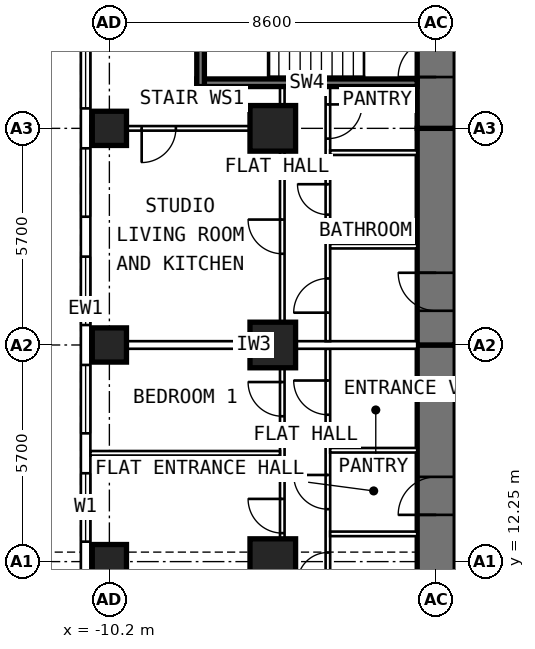
"""IFC4 building model, lengths in metres.
Left out: names, types, materials, properties, quantities, classifications, styles, units other than length and angle.
Written with IfcOpenShell. Run it as: python <this file> out.ifc"""

import sys

from ifc_helpers import new_model, si_unit, direction, frame, frame_2d, origin, origin_2d, place, context, subcontext, project, spatial, rectangle, extrude, element, fill, save


model = new_model("IFC4")
c1 = context("Model", 3, precision=1e-05, world=origin(), true_north=direction((0.0, 1.0)))
c2 = subcontext(c1, "Body", "Model", "MODEL_VIEW")
j1 = project(units=[si_unit("LENGTHUNIT", "METRE"), si_unit("PLANEANGLEUNIT", "RADIAN")], contexts=[c1])
p1 = place(None, origin())
s1 = spatial("IfcSite", under=j1, at=p1, CompositionType="ELEMENT")
p2 = place(p1, origin())
s2 = spatial("IfcBuilding", under=s1, at=p2, CompositionType="ELEMENT")
p3 = place(p2, frame((0.0, 0.0, 88.0)))
s3 = spatial("IfcBuildingStorey", under=s2, at=p3, CompositionType="ELEMENT", Elevation=88.0)
for number, where, z_axis, x_axis in (
    (1, (-10.2, 12.25, 0.0), (0.0, 0.0, 1.0), (0.0, 1.0, 0.0)),
    (2, (-10.2, 17.95, 0.0), (0.0, 0.0, 1.0), (0.0, 1.0, 0.0)),
    (3, (-10.2, 23.65, 0.0), (0.0, 0.0, 1.0), (0.0, 1.0, 0.0)),
):
    element("IfcColumn", number, at=place(p3, frame(where, z_axis=z_axis, x_axis=x_axis)), inside=s3, PredefinedType="COLUMN", context=c2, shape_type="SweptSolid", body=[
        extrude(rectangle(XDim=0.9, YDim=0.9, at=origin_2d()), origin(), (0.0, 0.0, 1.0), 3.6),
    ])
for number, where, z_axis, x_axis in (
    (4, (-5.9, 12.25, 0.0), (0.0, 0.0, 1.0), (0.0, 1.0, 0.0)),
    (5, (-5.9, 17.95, 0.0), (0.0, 0.0, 1.0), (0.0, 1.0, 0.0)),
    (6, (-5.9, 23.65, 0.0), (0.0, 0.0, 1.0), (0.0, 1.0, 0.0)),
):
    element("IfcColumn", number, at=place(p3, frame(where, z_axis=z_axis, x_axis=x_axis)), inside=s3, PredefinedType="COLUMN", context=c2, shape_type="SweptSolid", body=[
        extrude(rectangle(XDim=1.2, YDim=1.2, at=origin_2d()), origin(), (0.0, 0.0, 1.0), 3.6),
    ])
p4 = place(p3, frame((-1.6, 9.6, 0.0), z_axis=(0.0, 0.0, 1.0), x_axis=(0.0, 1.0, 0.0)))
e7 = element("IfcWall", 7, at=p4, inside=s3, PredefinedType="SHEAR", context=c2, shape_type="SweptSolid", body=[
    extrude(rectangle(XDim=8.35, YDim=1.0, at=frame_2d((4.175, 0.0))), origin(), (0.0, 0.0, 1.0), 3.6),
])
p5 = place(p4, frame((3.88, 0.0, 0.0)))
e8 = element("IfcOpeningElement", 8, at=p5, cuts=e7, PredefinedType="OPENING", context=c2, shape_type="SweptSolid", body=[
    extrude(rectangle(XDim=1.0, YDim=2.1, at=frame_2d((0.5, 1.05))), frame((0.0, 0.512, 0.0), z_axis=(0.0, -1.0, 0.0), x_axis=(1.0, 0.0, 0.0)), (0.0, 0.0, 1.0), 1.024),
])
p6 = place(p3, frame((-1.6, 17.95, 0.0), z_axis=(0.0, 0.0, 1.0), x_axis=(0.0, 1.0, 0.0)))
e9 = element("IfcWall", 9, at=p6, inside=s3, PredefinedType="SHEAR", context=c2, shape_type="SweptSolid", body=[
    extrude(rectangle(XDim=5.7, YDim=1.0, at=frame_2d((2.85, 0.0))), origin(), (0.0, 0.0, 1.0), 3.6),
])
p7 = place(p6, frame((0.9, 0.0, 0.0)))
e10 = element("IfcOpeningElement", 10, at=p7, cuts=e9, PredefinedType="OPENING", context=c2, shape_type="SweptSolid", body=[
    extrude(rectangle(XDim=1.0, YDim=2.1, at=frame_2d((0.5, 1.05))), frame((0.0, 0.512, 0.0), z_axis=(0.0, -1.0, 0.0), x_axis=(1.0, 0.0, 0.0)), (0.0, 0.0, 1.0), 1.024),
])
p8 = place(p3, frame((-1.6, 23.65, 0.0), z_axis=(0.0, 0.0, 1.0), x_axis=(0.0, 1.0, 0.0)))
e11 = element("IfcWall", 11, at=p8, inside=s3, PredefinedType="SHEAR", context=c2, shape_type="SweptSolid", body=[
    extrude(rectangle(XDim=10.745, YDim=1.0, at=frame_2d((5.373, 0.0))), origin(), (0.0, 0.0, 1.0), 3.6),
])
p9 = place(p8, frame((1.35, 0.0, 0.0)))
e12 = element("IfcOpeningElement", 12, at=p9, cuts=e11, PredefinedType="OPENING", context=c2, shape_type="SweptSolid", body=[
    extrude(rectangle(XDim=1.0, YDim=2.1, at=frame_2d((0.5, 1.05))), frame((0.0, 0.512, 0.0), z_axis=(0.0, -1.0, 0.0), x_axis=(1.0, 0.0, 0.0)), (0.0, 0.0, 1.0), 1.024),
])
p10 = place(p3, frame((-10.825, 6.148, 0.0), z_axis=(0.0, 0.0, 1.0), x_axis=(0.0, 1.0, 0.0)))
e13 = element("IfcWall", 13, at=p10, inside=s3, PredefinedType="SOLIDWALL", context=c2, shape_type="SweptSolid", body=[
    extrude(rectangle(XDim=25.487, YDim=0.25, at=frame_2d((12.744, 0.0))), origin(), (0.0, 0.0, 1.0), 3.35),
])
p11 = place(p10, frame((0.927, 0.0, 0.8)))
e14 = element("IfcOpeningElement", 14, at=p11, cuts=e13, PredefinedType="OPENING", context=c2, shape_type="SweptSolid", body=[
    extrude(rectangle(XDim=1.8, YDim=1.8, at=frame_2d((0.9, 0.9))), frame((0.0, 0.137, 0.0), z_axis=(0.0, -1.0, 0.0), x_axis=(1.0, 0.0, 0.0)), (0.0, 0.0, 1.0), 0.274),
])
p12 = place(p10, frame((3.777, 0.0, 0.8)))
e15 = element("IfcOpeningElement", 15, at=p12, cuts=e13, PredefinedType="OPENING", context=c2, shape_type="SweptSolid", body=[
    extrude(rectangle(XDim=1.8, YDim=1.8, at=frame_2d((0.9, 0.9))), frame((0.0, 0.137, 0.0), z_axis=(0.0, -1.0, 0.0), x_axis=(1.0, 0.0, 0.0)), (0.0, 0.0, 1.0), 0.274),
])
p13 = place(p10, frame((6.627, 0.0, 0.8)))
e16 = element("IfcOpeningElement", 16, at=p13, cuts=e13, PredefinedType="OPENING", context=c2, shape_type="SweptSolid", body=[
    extrude(rectangle(XDim=1.8, YDim=1.8, at=frame_2d((0.9, 0.9))), frame((0.0, 0.137, 0.0), z_axis=(0.0, -1.0, 0.0), x_axis=(1.0, 0.0, 0.0)), (0.0, 0.0, 1.0), 0.274),
])
p14 = place(p10, frame((9.477, 0.0, 0.8)))
e17 = element("IfcOpeningElement", 17, at=p14, cuts=e13, PredefinedType="OPENING", context=c2, shape_type="SweptSolid", body=[
    extrude(rectangle(XDim=1.8, YDim=1.8, at=frame_2d((0.9, 0.9))), frame((0.0, 0.137, 0.0), z_axis=(0.0, -1.0, 0.0), x_axis=(1.0, 0.0, 0.0)), (0.0, 0.0, 1.0), 0.274),
])
p15 = place(p10, frame((12.327, 0.0, 0.8)))
e18 = element("IfcOpeningElement", 18, at=p15, cuts=e13, PredefinedType="OPENING", context=c2, shape_type="SweptSolid", body=[
    extrude(rectangle(XDim=1.8, YDim=1.8, at=frame_2d((0.9, 0.9))), frame((0.0, 0.137, 0.0), z_axis=(0.0, -1.0, 0.0), x_axis=(1.0, 0.0, 0.0)), (0.0, 0.0, 1.0), 0.274),
])
p16 = place(p10, frame((15.177, 0.0, 0.8)))
e19 = element("IfcOpeningElement", 19, at=p16, cuts=e13, PredefinedType="OPENING", context=c2, shape_type="SweptSolid", body=[
    extrude(rectangle(XDim=1.8, YDim=1.8, at=frame_2d((0.9, 0.9))), frame((0.0, 0.137, 0.0), z_axis=(0.0, -1.0, 0.0), x_axis=(1.0, 0.0, 0.0)), (0.0, 0.0, 1.0), 0.274),
])
p17 = place(p10, frame((18.027, 0.0, 0.8)))
e20 = element("IfcOpeningElement", 20, at=p17, cuts=e13, PredefinedType="OPENING", context=c2, shape_type="SweptSolid", body=[
    extrude(rectangle(XDim=1.8, YDim=1.8, at=frame_2d((0.9, 0.9))), frame((0.0, 0.137, 0.0), z_axis=(0.0, -1.0, 0.0), x_axis=(1.0, 0.0, 0.0)), (0.0, 0.0, 1.0), 0.274),
])
p18 = place(p10, frame((20.877, 0.0, 0.8)))
e21 = element("IfcOpeningElement", 21, at=p18, cuts=e13, PredefinedType="OPENING", context=c2, shape_type="SweptSolid", body=[
    extrude(rectangle(XDim=1.8, YDim=1.8, at=frame_2d((0.9, 0.9))), frame((0.0, 0.137, 0.0), z_axis=(0.0, -1.0, 0.0), x_axis=(1.0, 0.0, 0.0)), (0.0, 0.0, 1.0), 0.274),
])
p19 = place(p3, frame((-4.45, 10.1, 0.0), z_axis=(0.0, 0.0, 1.0), x_axis=(0.0, 1.0, 0.0)))
e22 = element("IfcWall", 22, at=p19, inside=s3, PredefinedType="PARTITIONING", context=c2, shape_type="SweptSolid", body=[
    extrude(rectangle(XDim=7.75, YDim=0.12, at=frame_2d((3.875, 0.0))), origin(), (0.0, 0.0, 1.0), 3.35),
])
p20 = place(p19, frame((1.59, 0.0, 0.0)))
e23 = element("IfcOpeningElement", 23, at=p20, cuts=e22, PredefinedType="OPENING", context=c2, shape_type="SweptSolid", body=[
    extrude(rectangle(XDim=0.8, YDim=2.1, at=frame_2d((0.4, 1.05))), frame((0.0, 0.072, 0.0), z_axis=(0.0, -1.0, 0.0), x_axis=(1.0, 0.0, 0.0)), (0.0, 0.0, 1.0), 0.144),
])
p21 = place(p19, frame((3.53, 0.0, 0.0)))
e24 = element("IfcOpeningElement", 24, at=p21, cuts=e22, PredefinedType="OPENING", context=c2, shape_type="SweptSolid", body=[
    extrude(rectangle(XDim=0.9, YDim=2.1, at=frame_2d((0.45, 1.05))), frame((0.0, 0.072, 0.0), z_axis=(0.0, -1.0, 0.0), x_axis=(1.0, 0.0, 0.0)), (0.0, 0.0, 1.0), 0.144),
])
p22 = place(p19, frame((6.015, 0.0, 0.0)))
e25 = element("IfcOpeningElement", 25, at=p22, cuts=e22, PredefinedType="OPENING", context=c2, shape_type="SweptSolid", body=[
    extrude(rectangle(XDim=0.9, YDim=2.1, at=frame_2d((0.45, 1.05))), frame((0.0, 0.072, 0.0), z_axis=(0.0, -1.0, 0.0), x_axis=(1.0, 0.0, 0.0)), (0.0, 0.0, 1.0), 0.144),
])
p23 = place(p3, frame((-5.65, 9.6, 0.0), z_axis=(0.0, 0.0, 1.0), x_axis=(0.0, 1.0, 0.0)))
e26 = element("IfcWall", 26, at=p23, inside=s3, PredefinedType="PARTITIONING", context=c2, shape_type="SweptSolid", body=[
    extrude(rectangle(XDim=8.1, YDim=0.12, at=frame_2d((4.05, 0.0))), origin(), (0.0, 0.0, 1.0), 3.35),
])
p24 = place(p23, frame((3.4, 0.0, 0.0)))
e27 = element("IfcOpeningElement", 27, at=p24, cuts=e26, PredefinedType="OPENING", context=c2, shape_type="SweptSolid", body=[
    extrude(rectangle(XDim=0.9, YDim=2.1, at=frame_2d((0.45, 1.05))), frame((0.0, 0.072, 0.0), z_axis=(0.0, -1.0, 0.0), x_axis=(1.0, 0.0, 0.0)), (0.0, 0.0, 1.0), 0.144),
])
p25 = place(p23, frame((6.475, 0.0, 0.0)))
e28 = element("IfcOpeningElement", 28, at=p25, cuts=e26, PredefinedType="OPENING", context=c2, shape_type="SweptSolid", body=[
    extrude(rectangle(XDim=0.9, YDim=2.1, at=frame_2d((0.45, 1.05))), frame((0.0, 0.072, 0.0), z_axis=(0.0, -1.0, 0.0), x_axis=(1.0, 0.0, 0.0)), (0.0, 0.0, 1.0), 0.144),
])
p26 = place(p3, frame((-5.71, 15.1, 0.0), z_axis=(0.0, 0.0, 1.0), x_axis=(-1.0, 0.0, 0.0)))
e29 = element("IfcWall", 29, at=p26, inside=s3, PredefinedType="PARTITIONING", context=c2, shape_type="SweptSolid", body=[
    extrude(rectangle(XDim=4.99, YDim=0.12, at=frame_2d((2.495, 0.0))), origin(), (0.0, 0.0, 1.0), 3.35),
])
for number, where, z_axis, x_axis in (
    (30, (-2.1, 12.98, 0.0), (0.0, 0.0, 1.0), (-1.0, 0.0, 0.0)),
    (31, (-2.1, 15.18, 0.0), (0.0, 0.0, 1.0), (-1.0, 0.0, 0.0)),
):
    element("IfcWall", number, at=place(p3, frame(where, z_axis=z_axis, x_axis=x_axis)), inside=s3, PredefinedType="PARTITIONING", context=c2, shape_type="SweptSolid", body=[
        extrude(rectangle(XDim=2.29, YDim=0.12, at=frame_2d((1.145, 0.0))), origin(), (0.0, 0.0, 1.0), 3.35),
    ])
p27 = place(p3, frame((-4.45, 18.05, 0.0), z_axis=(0.0, 0.0, 1.0), x_axis=(0.0, 1.0, 0.0)))
e32 = element("IfcWall", 32, at=p27, inside=s3, PredefinedType="PARTITIONING", context=c2, shape_type="SweptSolid", body=[
    extrude(rectangle(XDim=6.7, YDim=0.12, at=frame_2d((3.35, 0.0))), origin(), (0.0, 0.0, 1.0), 3.35),
])
p28 = place(p27, frame((0.75, 0.0, 0.0)))
e33 = element("IfcOpeningElement", 33, at=p28, cuts=e32, PredefinedType="OPENING", context=c2, shape_type="SweptSolid", body=[
    extrude(rectangle(XDim=0.9, YDim=2.1, at=frame_2d((0.45, 1.05))), frame((0.0, 0.072, 0.0), z_axis=(0.0, -1.0, 0.0), x_axis=(1.0, 0.0, 0.0)), (0.0, 0.0, 1.0), 0.144),
])
p29 = place(p27, frame((3.33, 0.0, 0.0)))
e34 = element("IfcOpeningElement", 34, at=p29, cuts=e32, PredefinedType="OPENING", context=c2, shape_type="SweptSolid", body=[
    extrude(rectangle(XDim=0.8, YDim=2.1, at=frame_2d((0.4, 1.05))), frame((0.0, 0.072, 0.0), z_axis=(0.0, -1.0, 0.0), x_axis=(1.0, 0.0, 0.0)), (0.0, 0.0, 1.0), 0.144),
])
p30 = place(p27, frame((5.33, 0.0, 0.0)))
e35 = element("IfcOpeningElement", 35, at=p30, cuts=e32, PredefinedType="OPENING", context=c2, shape_type="SweptSolid", body=[
    extrude(rectangle(XDim=0.9, YDim=2.1, at=frame_2d((0.45, 1.05))), frame((0.0, 0.072, 0.0), z_axis=(0.0, -1.0, 0.0), x_axis=(1.0, 0.0, 0.0)), (0.0, 0.0, 1.0), 0.144),
])
p31 = place(p3, frame((-5.65, 18.05, 0.0), z_axis=(0.0, 0.0, 1.0), x_axis=(0.0, 1.0, 0.0)))
e36 = element("IfcWall", 36, at=p31, inside=s3, PredefinedType="PARTITIONING", context=c2, shape_type="SweptSolid", body=[
    extrude(rectangle(XDim=6.7, YDim=0.12, at=frame_2d((3.35, 0.0))), origin(), (0.0, 0.0, 1.0), 3.35),
])
p32 = place(p31, frame((2.3, 0.0, 0.0)))
e37 = element("IfcOpeningElement", 37, at=p32, cuts=e36, PredefinedType="OPENING", context=c2, shape_type="SweptSolid", body=[
    extrude(rectangle(XDim=0.9, YDim=2.1, at=frame_2d((0.45, 1.05))), frame((0.0, 0.072, 0.0), z_axis=(0.0, -1.0, 0.0), x_axis=(1.0, 0.0, 0.0)), (0.0, 0.0, 1.0), 0.144),
])
for number, where, z_axis, x_axis in (
    (38, (-2.1, 20.55, 0.0), (0.0, 0.0, 1.0), (-1.0, 0.0, 0.0)),
    (39, (-2.1, 23.01, 0.0), (0.0, 0.0, 1.0), (-1.0, 0.0, 0.0)),
):
    element("IfcWall", number, at=place(p3, frame(where, z_axis=z_axis, x_axis=x_axis)), inside=s3, PredefinedType="PARTITIONING", context=c2, shape_type="SweptSolid", body=[
        extrude(rectangle(XDim=2.29, YDim=0.12, at=frame_2d((1.145, 0.0))), origin(), (0.0, 0.0, 1.0), 3.35),
    ])
p33 = place(p3, frame((-2.1, 17.95, 0.0), z_axis=(0.0, 0.0, 1.0), x_axis=(-1.0, 0.0, 0.0)))
e40 = element("IfcWall", 40, at=p33, inside=s3, PredefinedType="PARTITIONING", context=c2, shape_type="SweptSolid", body=[
    extrude(rectangle(XDim=8.6, YDim=0.2, at=frame_2d((4.3, 0.0))), origin(), (0.0, 0.0, 1.0), 2.45),
])
p34 = place(p3, frame((-5.71, 23.65, 0.0), z_axis=(0.0, 0.0, 1.0), x_axis=(-1.0, 0.0, 0.0)))
e41 = element("IfcWall", 41, at=p34, inside=s3, PredefinedType="PARTITIONING", context=c2, shape_type="SweptSolid", body=[
    extrude(rectangle(XDim=4.99, YDim=0.12, at=frame_2d((2.495, 0.0))), origin(), (0.0, 0.0, 1.0), 2.45),
])
p35 = place(p34, frame((2.74, 0.0, 0.0)))
e42 = element("IfcOpeningElement", 42, at=p35, cuts=e41, PredefinedType="OPENING", context=c2, shape_type="SweptSolid", body=[
    extrude(rectangle(XDim=0.9, YDim=2.1, at=frame_2d((0.45, 1.05))), frame((0.0, 0.072, 0.0), z_axis=(0.0, -1.0, 0.0), x_axis=(1.0, 0.0, 0.0)), (0.0, 0.0, 1.0), 0.144),
])
p36 = place(p3, frame((-2.1, 24.85, 0.0), z_axis=(0.0, 0.0, 1.0), x_axis=(-1.0, 0.0, 0.0)))
e43 = element("IfcWall", 43, at=p36, inside=s3, PredefinedType="SHEAR", context=c2, shape_type="SweptSolid", body=[
    extrude(rectangle(XDim=5.8, YDim=0.2, at=frame_2d((2.9, 0.0))), origin(), (0.0, 0.0, 1.0), 3.33),
])
p37 = place(p3, frame((-7.8, 24.75, 0.0), z_axis=(0.0, 0.0, 1.0), x_axis=(0.0, 1.0, 0.0)))
e44 = element("IfcWall", 44, at=p37, inside=s3, PredefinedType="SHEAR", context=c2, shape_type="SweptSolid", body=[
    extrude(rectangle(XDim=4.0, YDim=0.2, at=frame_2d((2.0, 0.0))), origin(), (0.0, 0.0, 1.0), 3.33),
])
p38 = place(p13, origin())
e45 = element("IfcWindow", 45, at=p38, inside=s3, PartitioningType="SINGLE_PANEL", PredefinedType="WINDOW", context=c2, shape_type="SweptSolid", body=[
    extrude(rectangle(XDim=1.8, YDim=1.8, at=frame_2d((0.9, 0.9))), frame((0.0, 0.03, 0.0), z_axis=(0.0, -1.0, 0.0), x_axis=(1.0, 0.0, 0.0)), (0.0, 0.0, 1.0), 0.06),
])
fill(e16, e45)
p39 = place(p14, origin())
e46 = element("IfcWindow", 46, at=p39, inside=s3, PartitioningType="SINGLE_PANEL", PredefinedType="WINDOW", context=c2, shape_type="SweptSolid", body=[
    extrude(rectangle(XDim=1.8, YDim=1.8, at=frame_2d((0.9, 0.9))), frame((0.0, 0.03, 0.0), z_axis=(0.0, -1.0, 0.0), x_axis=(1.0, 0.0, 0.0)), (0.0, 0.0, 1.0), 0.06),
])
fill(e17, e46)
p40 = place(p15, origin())
e47 = element("IfcWindow", 47, at=p40, inside=s3, PartitioningType="SINGLE_PANEL", PredefinedType="WINDOW", context=c2, shape_type="SweptSolid", body=[
    extrude(rectangle(XDim=1.8, YDim=1.8, at=frame_2d((0.9, 0.9))), frame((0.0, 0.03, 0.0), z_axis=(0.0, -1.0, 0.0), x_axis=(1.0, 0.0, 0.0)), (0.0, 0.0, 1.0), 0.06),
])
fill(e18, e47)
p41 = place(p16, origin())
e48 = element("IfcWindow", 48, at=p41, inside=s3, PartitioningType="SINGLE_PANEL", PredefinedType="WINDOW", context=c2, shape_type="SweptSolid", body=[
    extrude(rectangle(XDim=1.8, YDim=1.8, at=frame_2d((0.9, 0.9))), frame((0.0, 0.03, 0.0), z_axis=(0.0, -1.0, 0.0), x_axis=(1.0, 0.0, 0.0)), (0.0, 0.0, 1.0), 0.06),
])
fill(e19, e48)
p42 = place(p17, origin())
e49 = element("IfcWindow", 49, at=p42, inside=s3, PartitioningType="SINGLE_PANEL", PredefinedType="WINDOW", context=c2, shape_type="SweptSolid", body=[
    extrude(rectangle(XDim=1.8, YDim=1.8, at=frame_2d((0.9, 0.9))), frame((0.0, 0.03, 0.0), z_axis=(0.0, -1.0, 0.0), x_axis=(1.0, 0.0, 0.0)), (0.0, 0.0, 1.0), 0.06),
])
fill(e20, e49)
p43 = place(p5, origin())
e50 = element("IfcDoor", 50, at=p43, inside=s3, OperationType="SINGLE_SWING_LEFT", PredefinedType="DOOR", context=c2, shape_type="SweptSolid", body=[
    extrude(rectangle(XDim=1.0, YDim=2.1, at=frame_2d((0.5, 1.05))), frame((0.0, 0.25, 0.0), z_axis=(0.0, -1.0, 0.0), x_axis=(1.0, 0.0, 0.0)), (0.0, 0.0, 1.0), 0.5),
])
fill(e8, e50)
p44 = place(p24, origin())
e51 = element("IfcDoor", 51, at=p44, inside=s3, OperationType="SINGLE_SWING_RIGHT", PredefinedType="DOOR", context=c2, shape_type="SweptSolid", body=[
    extrude(rectangle(XDim=0.9, YDim=2.1, at=frame_2d((0.45, 1.05))), frame((0.0, 0.025, 0.0), z_axis=(0.0, -1.0, 0.0), x_axis=(1.0, 0.0, 0.0)), (0.0, 0.0, 1.0), 0.05),
])
fill(e27, e51)
p45 = place(p25, origin())
e52 = element("IfcDoor", 52, at=p45, inside=s3, OperationType="SINGLE_SWING_RIGHT", PredefinedType="DOOR", context=c2, shape_type="SweptSolid", body=[
    extrude(rectangle(XDim=0.9, YDim=2.1, at=frame_2d((0.45, 1.05))), frame((0.0, 0.025, 0.0), z_axis=(0.0, -1.0, 0.0), x_axis=(1.0, 0.0, 0.0)), (0.0, 0.0, 1.0), 0.05),
])
fill(e28, e52)
p46 = place(p20, origin())
e53 = element("IfcDoor", 53, at=p46, inside=s3, OperationType="SINGLE_SWING_LEFT", PredefinedType="DOOR", context=c2, shape_type="SweptSolid", body=[
    extrude(rectangle(XDim=0.8, YDim=2.1, at=frame_2d((0.4, 1.05))), frame((0.0, 0.025, 0.0), z_axis=(0.0, -1.0, 0.0), x_axis=(1.0, 0.0, 0.0)), (0.0, 0.0, 1.0), 0.05),
])
fill(e23, e53)
p47 = place(p21, origin())
e54 = element("IfcDoor", 54, at=p47, inside=s3, OperationType="SINGLE_SWING_RIGHT", PredefinedType="DOOR", context=c2, shape_type="SweptSolid", body=[
    extrude(rectangle(XDim=0.9, YDim=2.1, at=frame_2d((0.45, 1.05))), frame((0.0, 0.025, 0.0), z_axis=(0.0, -1.0, 0.0), x_axis=(1.0, 0.0, 0.0)), (0.0, 0.0, 1.0), 0.05),
])
fill(e24, e54)
p48 = place(p22, origin())
e55 = element("IfcDoor", 55, at=p48, inside=s3, OperationType="SINGLE_SWING_RIGHT", PredefinedType="DOOR", context=c2, shape_type="SweptSolid", body=[
    extrude(rectangle(XDim=0.9, YDim=2.1, at=frame_2d((0.45, 1.05))), frame((0.0, 0.025, 0.0), z_axis=(0.0, -1.0, 0.0), x_axis=(1.0, 0.0, 0.0)), (0.0, 0.0, 1.0), 0.05),
])
fill(e25, e55)
p49 = place(p7, origin())
e56 = element("IfcDoor", 56, at=p49, inside=s3, OperationType="SINGLE_SWING_RIGHT", PredefinedType="DOOR", context=c2, shape_type="SweptSolid", body=[
    extrude(rectangle(XDim=1.0, YDim=2.1, at=frame_2d((0.5, 1.05))), frame((0.0, 0.25, 0.0), z_axis=(0.0, -1.0, 0.0), x_axis=(1.0, 0.0, 0.0)), (0.0, 0.0, 1.0), 0.5),
])
fill(e10, e56)
p50 = place(p32, origin())
e57 = element("IfcDoor", 57, at=p50, inside=s3, OperationType="SINGLE_SWING_RIGHT", PredefinedType="DOOR", context=c2, shape_type="SweptSolid", body=[
    extrude(rectangle(XDim=0.9, YDim=2.1, at=frame_2d((0.45, 1.05))), frame((0.0, 0.025, 0.0), z_axis=(0.0, -1.0, 0.0), x_axis=(1.0, 0.0, 0.0)), (0.0, 0.0, 1.0), 0.05),
])
fill(e37, e57)
p51 = place(p28, origin())
e58 = element("IfcDoor", 58, at=p51, inside=s3, OperationType="SINGLE_SWING_LEFT", PredefinedType="DOOR", context=c2, shape_type="SweptSolid", body=[
    extrude(rectangle(XDim=0.9, YDim=2.1, at=frame_2d((0.45, 1.05))), frame((0.0, 0.025, 0.0), z_axis=(0.0, -1.0, 0.0), x_axis=(1.0, 0.0, 0.0)), (0.0, 0.0, 1.0), 0.05),
])
fill(e33, e58)
p52 = place(p29, origin())
e59 = element("IfcDoor", 59, at=p52, inside=s3, OperationType="SINGLE_SWING_RIGHT", PredefinedType="DOOR", context=c2, shape_type="SweptSolid", body=[
    extrude(rectangle(XDim=0.8, YDim=2.1, at=frame_2d((0.4, 1.05))), frame((0.0, 0.025, 0.0), z_axis=(0.0, -1.0, 0.0), x_axis=(1.0, 0.0, 0.0)), (0.0, 0.0, 1.0), 0.05),
])
fill(e34, e59)
p53 = place(p30, frame((0.9, 0.0, 0.0), z_axis=(0.0, 0.0, 1.0), x_axis=(-1.0, 0.0, 0.0)))
e60 = element("IfcDoor", 60, at=p53, inside=s3, OperationType="SINGLE_SWING_LEFT", PredefinedType="DOOR", context=c2, shape_type="SweptSolid", body=[
    extrude(rectangle(XDim=0.9, YDim=2.1, at=frame_2d((0.45, 1.05))), frame((0.0, 0.025, 0.0), z_axis=(0.0, -1.0, 0.0), x_axis=(1.0, 0.0, 0.0)), (0.0, 0.0, 1.0), 0.05),
])
fill(e35, e60)
p54 = place(p35, origin())
e61 = element("IfcDoor", 61, at=p54, inside=s3, OperationType="SINGLE_SWING_RIGHT", PredefinedType="DOOR", context=c2, shape_type="SweptSolid", body=[
    extrude(rectangle(XDim=0.9, YDim=2.1, at=frame_2d((0.45, 1.05))), frame((0.0, 0.025, 0.0), z_axis=(0.0, -1.0, 0.0), x_axis=(1.0, 0.0, 0.0)), (0.0, 0.0, 1.0), 0.05),
])
fill(e42, e61)
p55 = place(p9, origin())
e62 = element("IfcDoor", 62, at=p55, inside=s3, OperationType="SINGLE_SWING_LEFT", PredefinedType="DOOR", context=c2, shape_type="SweptSolid", body=[
    extrude(rectangle(XDim=1.0, YDim=2.1, at=frame_2d((0.5, 1.05))), frame((0.0, 0.25, 0.0), z_axis=(0.0, -1.0, 0.0), x_axis=(1.0, 0.0, 0.0)), (0.0, 0.0, 1.0), 0.5),
])
fill(e12, e62)
save(model, sys.argv[1])
